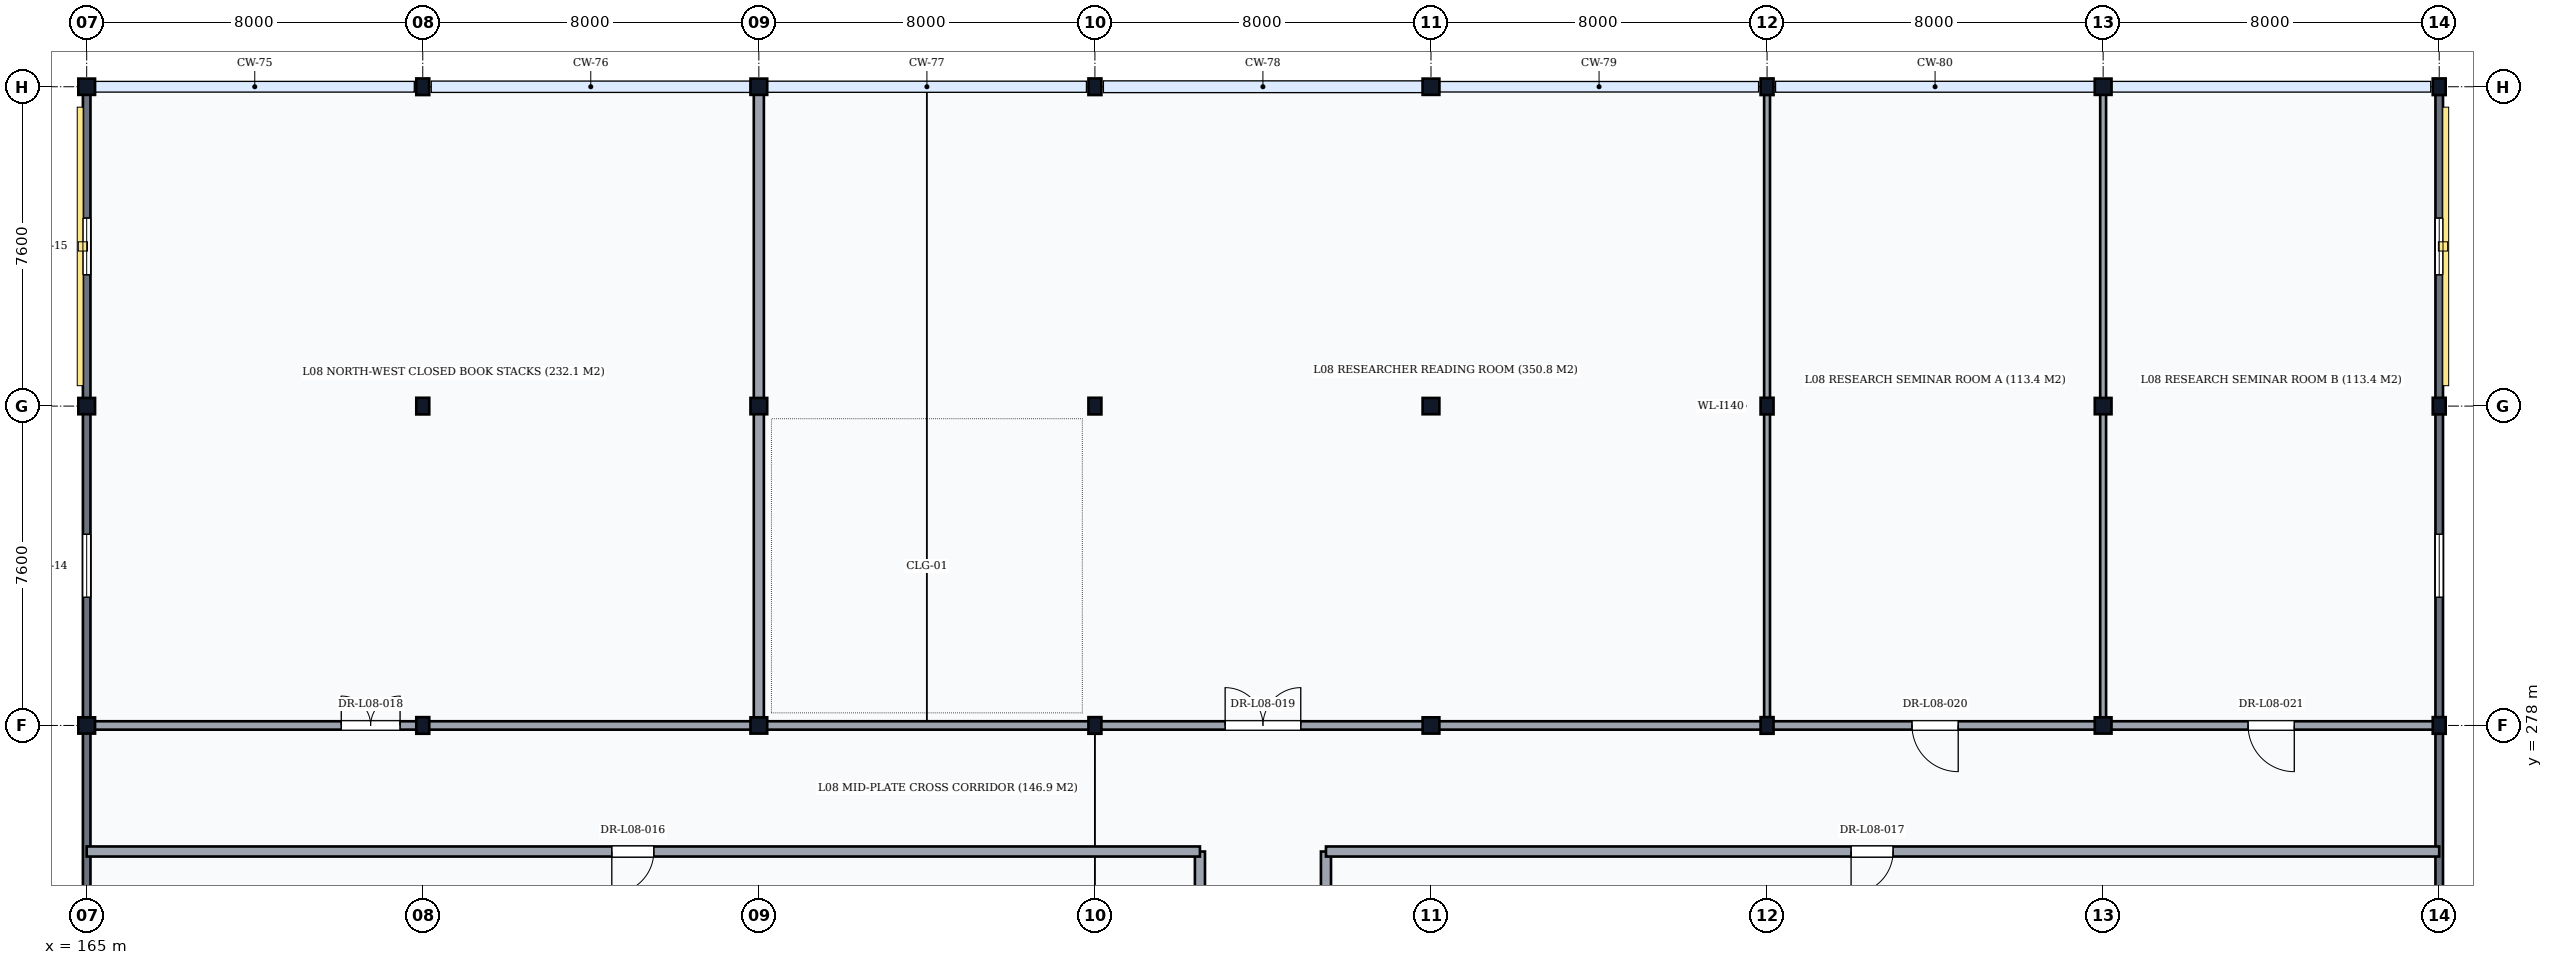
"""IFC4 building model, lengths in metres.
Left out: names, types, materials, properties, quantities, classifications, styles, units other than length and angle.
Written with IfcOpenShell. Run it as: python <this file> out.ifc"""

import sys

from ifc_helpers import new_model, si_unit, direction, frame, frame_2d, origin, origin_2d, place, context, subcontext, project, spatial, rectangle, i_section, extrude, element, fill, save


model = new_model("IFC4")
c1 = context("Model", 3, precision=1e-05, world=origin(), true_north=direction((0.0, 1.0)))
c2 = subcontext(c1, "Body", "Model", "MODEL_VIEW")
j1 = project(units=[si_unit("LENGTHUNIT", "METRE"), si_unit("PLANEANGLEUNIT", "RADIAN")], contexts=[c1])
p1 = place(None, origin())
s1 = spatial("IfcSite", under=j1, at=p1, CompositionType="ELEMENT")
p2 = place(p1, origin())
s2 = spatial("IfcBuilding", under=s1, at=p2, CompositionType="ELEMENT")
p3 = place(p2, frame((0.0, 0.0, 32.1)))
s3 = spatial("IfcBuildingStorey", under=s2, at=p3, CompositionType="ELEMENT", Elevation=32.1)
for number, where, z_axis, x_axis in (
    (1, (165.0, 278.0, 0.0), (0.0, 0.0, 1.0), (1.0, 0.0, 0.0)),
    (2, (165.0, 285.6, 0.0), (0.0, 0.0, 1.0), (1.0, 0.0, 0.0)),
    (3, (165.0, 293.2, 0.0), (0.0, 0.0, 1.0), (1.0, 0.0, 0.0)),
):
    element("IfcColumn", number, at=place(p3, frame(where, z_axis=z_axis, x_axis=x_axis)), inside=s3, PredefinedType="COLUMN", context=c2, shape_type="SweptSolid", body=[
        extrude(i_section(OverallWidth=0.398, OverallDepth=0.387, WebThickness=0.021, FlangeThickness=0.033, FilletRadius=0.015, at=origin_2d()), origin(), (0.0, 0.0, 1.0), 3.9),
    ])
for number, where, z_axis, x_axis in (
    (4, (173.0, 278.0, 0.0), (0.0, 0.0, 1.0), (1.0, 0.0, 0.0)),
    (5, (173.0, 285.6, 0.0), (0.0, 0.0, 1.0), (1.0, 0.0, 0.0)),
    (6, (173.0, 293.2, 0.0), (0.0, 0.0, 1.0), (1.0, 0.0, 0.0)),
):
    element("IfcColumn", number, at=place(p3, frame(where, z_axis=z_axis, x_axis=x_axis)), inside=s3, PredefinedType="COLUMN", context=c2, shape_type="SweptSolid", body=[
        extrude(i_section(OverallWidth=0.308, OverallDepth=0.395, WebThickness=0.021, FlangeThickness=0.04, FilletRadius=0.027, at=origin_2d()), origin(), (0.0, 0.0, 1.0), 3.9),
    ])
for number, where, z_axis, x_axis in (
    (7, (181.0, 278.0, 0.0), (0.0, 0.0, 1.0), (1.0, 0.0, 0.0)),
    (8, (181.0, 285.6, 0.0), (0.0, 0.0, 1.0), (1.0, 0.0, 0.0)),
    (9, (181.0, 293.2, 0.0), (0.0, 0.0, 1.0), (1.0, 0.0, 0.0)),
):
    element("IfcColumn", number, at=place(p3, frame(where, z_axis=z_axis, x_axis=x_axis)), inside=s3, PredefinedType="COLUMN", context=c2, shape_type="SweptSolid", body=[
        extrude(i_section(OverallWidth=0.398, OverallDepth=0.387, WebThickness=0.021, FlangeThickness=0.033, FilletRadius=0.015, at=origin_2d()), origin(), (0.0, 0.0, 1.0), 3.9),
    ])
for number, where, z_axis, x_axis in (
    (10, (189.0, 278.0, 0.0), (0.0, 0.0, 1.0), (1.0, 0.0, 0.0)),
    (11, (189.0, 285.6, 0.0), (0.0, 0.0, 1.0), (1.0, 0.0, 0.0)),
    (12, (189.0, 293.2, 0.0), (0.0, 0.0, 1.0), (1.0, 0.0, 0.0)),
):
    element("IfcColumn", number, at=place(p3, frame(where, z_axis=z_axis, x_axis=x_axis)), inside=s3, PredefinedType="COLUMN", context=c2, shape_type="SweptSolid", body=[
        extrude(i_section(OverallWidth=0.308, OverallDepth=0.395, WebThickness=0.021, FlangeThickness=0.04, FilletRadius=0.027, at=origin_2d()), origin(), (0.0, 0.0, 1.0), 3.9),
    ])
for number, where, z_axis, x_axis in (
    (13, (197.0, 278.0, 0.0), (0.0, 0.0, 1.0), (1.0, 0.0, 0.0)),
    (14, (197.0, 285.6, 0.0), (0.0, 0.0, 1.0), (1.0, 0.0, 0.0)),
    (15, (197.0, 293.2, 0.0), (0.0, 0.0, 1.0), (1.0, 0.0, 0.0)),
):
    element("IfcColumn", number, at=place(p3, frame(where, z_axis=z_axis, x_axis=x_axis)), inside=s3, PredefinedType="COLUMN", context=c2, shape_type="SweptSolid", body=[
        extrude(i_section(OverallWidth=0.398, OverallDepth=0.387, WebThickness=0.021, FlangeThickness=0.033, FilletRadius=0.015, at=origin_2d()), origin(), (0.0, 0.0, 1.0), 3.9),
    ])
for number, where, z_axis, x_axis in (
    (16, (205.0, 278.0, 0.0), (0.0, 0.0, 1.0), (1.0, 0.0, 0.0)),
    (17, (205.0, 285.6, 0.0), (0.0, 0.0, 1.0), (1.0, 0.0, 0.0)),
    (18, (205.0, 293.2, 0.0), (0.0, 0.0, 1.0), (1.0, 0.0, 0.0)),
):
    element("IfcColumn", number, at=place(p3, frame(where, z_axis=z_axis, x_axis=x_axis)), inside=s3, PredefinedType="COLUMN", context=c2, shape_type="SweptSolid", body=[
        extrude(i_section(OverallWidth=0.308, OverallDepth=0.395, WebThickness=0.021, FlangeThickness=0.04, FilletRadius=0.027, at=origin_2d()), origin(), (0.0, 0.0, 1.0), 3.9),
    ])
for number, where, z_axis, x_axis in (
    (19, (213.0, 278.0, 0.0), (0.0, 0.0, 1.0), (1.0, 0.0, 0.0)),
    (20, (213.0, 285.6, 0.0), (0.0, 0.0, 1.0), (1.0, 0.0, 0.0)),
    (21, (213.0, 293.2, 0.0), (0.0, 0.0, 1.0), (1.0, 0.0, 0.0)),
):
    element("IfcColumn", number, at=place(p3, frame(where, z_axis=z_axis, x_axis=x_axis)), inside=s3, PredefinedType="COLUMN", context=c2, shape_type="SweptSolid", body=[
        extrude(i_section(OverallWidth=0.398, OverallDepth=0.387, WebThickness=0.021, FlangeThickness=0.033, FilletRadius=0.015, at=origin_2d()), origin(), (0.0, 0.0, 1.0), 3.9),
    ])
for number, where, z_axis, x_axis in (
    (22, (221.0, 278.0, 0.0), (0.0, 0.0, 1.0), (1.0, 0.0, 0.0)),
    (23, (221.0, 285.6, 0.0), (0.0, 0.0, 1.0), (1.0, 0.0, 0.0)),
    (24, (221.0, 293.2, 0.0), (0.0, 0.0, 1.0), (1.0, 0.0, 0.0)),
):
    element("IfcColumn", number, at=place(p3, frame(where, z_axis=z_axis, x_axis=x_axis)), inside=s3, PredefinedType="COLUMN", context=c2, shape_type="SweptSolid", body=[
        extrude(i_section(OverallWidth=0.308, OverallDepth=0.395, WebThickness=0.021, FlangeThickness=0.04, FilletRadius=0.027, at=origin_2d()), origin(), (0.0, 0.0, 1.0), 3.9),
    ])
p4 = place(p3, frame((165.0, 270.406, 0.0), z_axis=(0.0, 0.0, 1.0), x_axis=(0.0, 1.0, 0.0)))
e25 = element("IfcWall", 25, at=p4, inside=s3, PredefinedType="SOLIDWALL", context=c2, shape_type="SweptSolid", body=[
    extrude(rectangle(XDim=7.588, YDim=0.18, at=frame_2d((3.794, 0.0))), origin(), (0.0, 0.0, 1.0), 3.408),
])
p5 = place(p4, frame((1.722, 0.0, 0.95)))
e26 = element("IfcOpeningElement", 26, at=p5, cuts=e25, PredefinedType="OPENING", context=c2, shape_type="SweptSolid", body=[
    extrude(rectangle(XDim=1.6, YDim=2.0, at=frame_2d((0.8, 1.0))), frame((0.0, 0.105, 0.0), z_axis=(0.0, -1.0, 0.0), x_axis=(1.0, 0.0, 0.0)), (0.0, 0.0, 1.0), 0.21),
])
p6 = place(p3, frame((165.0, 278.006, 0.0), z_axis=(0.0, 0.0, 1.0), x_axis=(0.0, 1.0, 0.0)))
e27 = element("IfcWall", 27, at=p6, inside=s3, PredefinedType="SOLIDWALL", context=c2, shape_type="SweptSolid", body=[
    extrude(rectangle(XDim=7.588, YDim=0.18, at=frame_2d((3.794, 0.0))), origin(), (0.0, 0.0, 1.0), 3.408),
])
p7 = place(p6, frame((3.044, 0.0, 0.95)))
e28 = element("IfcOpeningElement", 28, at=p7, cuts=e27, PredefinedType="OPENING", context=c2, shape_type="SweptSolid", body=[
    extrude(rectangle(XDim=1.5, YDim=1.9, at=frame_2d((0.75, 0.95))), frame((0.0, 0.105, 0.0), z_axis=(0.0, -1.0, 0.0), x_axis=(1.0, 0.0, 0.0)), (0.0, 0.0, 1.0), 0.21),
])
p8 = place(p3, frame((165.0, 285.606, 0.0), z_axis=(0.0, 0.0, 1.0), x_axis=(0.0, 1.0, 0.0)))
e29 = element("IfcWall", 29, at=p8, inside=s3, PredefinedType="SOLIDWALL", context=c2, shape_type="SweptSolid", body=[
    extrude(rectangle(XDim=7.588, YDim=0.18, at=frame_2d((3.794, 0.0))), origin(), (0.0, 0.0, 1.0), 3.408),
])
p9 = place(p8, frame((3.119, 0.0, 0.95)))
e30 = element("IfcOpeningElement", 30, at=p9, cuts=e29, PredefinedType="OPENING", context=c2, shape_type="SweptSolid", body=[
    extrude(rectangle(XDim=1.35, YDim=1.8, at=frame_2d((0.675, 0.9))), frame((0.0, 0.105, 0.0), z_axis=(0.0, -1.0, 0.0), x_axis=(1.0, 0.0, 0.0)), (0.0, 0.0, 1.0), 0.21),
])
p10 = place(p3, frame((221.0, 270.406, 0.0), z_axis=(0.0, 0.0, 1.0), x_axis=(0.0, 1.0, 0.0)))
e31 = element("IfcWall", 31, at=p10, inside=s3, PredefinedType="SOLIDWALL", context=c2, shape_type="SweptSolid", body=[
    extrude(rectangle(XDim=7.588, YDim=0.18, at=frame_2d((3.794, 0.0))), origin(), (0.0, 0.0, 1.0), 3.408),
])
p11 = place(p10, frame((1.722, 0.0, 0.95)))
e32 = element("IfcOpeningElement", 32, at=p11, cuts=e31, PredefinedType="OPENING", context=c2, shape_type="SweptSolid", body=[
    extrude(rectangle(XDim=1.6, YDim=2.0, at=frame_2d((0.8, 1.0))), frame((0.0, 0.105, 0.0), z_axis=(0.0, -1.0, 0.0), x_axis=(1.0, 0.0, 0.0)), (0.0, 0.0, 1.0), 0.21),
])
p12 = place(p3, frame((221.0, 278.006, 0.0), z_axis=(0.0, 0.0, 1.0), x_axis=(0.0, 1.0, 0.0)))
e33 = element("IfcWall", 33, at=p12, inside=s3, PredefinedType="SOLIDWALL", context=c2, shape_type="SweptSolid", body=[
    extrude(rectangle(XDim=7.588, YDim=0.18, at=frame_2d((3.794, 0.0))), origin(), (0.0, 0.0, 1.0), 3.408),
])
p13 = place(p12, frame((3.044, 0.0, 0.95)))
e34 = element("IfcOpeningElement", 34, at=p13, cuts=e33, PredefinedType="OPENING", context=c2, shape_type="SweptSolid", body=[
    extrude(rectangle(XDim=1.5, YDim=1.9, at=frame_2d((0.75, 0.95))), frame((0.0, 0.105, 0.0), z_axis=(0.0, -1.0, 0.0), x_axis=(1.0, 0.0, 0.0)), (0.0, 0.0, 1.0), 0.21),
])
p14 = place(p3, frame((221.0, 285.606, 0.0), z_axis=(0.0, 0.0, 1.0), x_axis=(0.0, 1.0, 0.0)))
e35 = element("IfcWall", 35, at=p14, inside=s3, PredefinedType="SOLIDWALL", context=c2, shape_type="SweptSolid", body=[
    extrude(rectangle(XDim=7.588, YDim=0.18, at=frame_2d((3.794, 0.0))), origin(), (0.0, 0.0, 1.0), 3.408),
])
p15 = place(p14, frame((3.119, 0.0, 0.95)))
e36 = element("IfcOpeningElement", 36, at=p15, cuts=e35, PredefinedType="OPENING", context=c2, shape_type="SweptSolid", body=[
    extrude(rectangle(XDim=1.35, YDim=1.8, at=frame_2d((0.675, 0.9))), frame((0.0, 0.105, 0.0), z_axis=(0.0, -1.0, 0.0), x_axis=(1.0, 0.0, 0.0)), (0.0, 0.0, 1.0), 0.21),
])
for number, where, z_axis, x_axis in (
    (37, (191.5, 258.2, 0.0), (0.0, 0.0, 1.0), (0.0, 1.0, 0.0)),
    (38, (194.5, 258.2, 0.0), (0.0, 0.0, 1.0), (0.0, 1.0, 0.0)),
):
    element("IfcWall", number, at=place(p3, frame(where, z_axis=z_axis, x_axis=x_axis)), inside=s3, PredefinedType="PARTITIONING", context=c2, shape_type="SweptSolid", body=[
        extrude(rectangle(XDim=16.8, YDim=0.24, at=frame_2d((8.4, 0.0))), origin(), (0.0, 0.0, 1.0), 3.68),
    ])
p16 = place(p3, frame((165.0, 275.0, 0.0), z_axis=(0.0, 0.0, 1.0), x_axis=(1.0, 0.0, 0.0)))
e39 = element("IfcWall", 39, at=p16, inside=s3, PredefinedType="PARTITIONING", context=c2, shape_type="SweptSolid", body=[
    extrude(rectangle(XDim=26.5, YDim=0.24, at=frame_2d((13.25, 0.0))), origin(), (0.0, 0.0, 1.0), 3.68),
])
p17 = place(p16, frame((12.5, 0.0, 0.0)))
e40 = element("IfcOpeningElement", 40, at=p17, cuts=e39, PredefinedType="OPENING", context=c2, shape_type="SweptSolid", body=[
    extrude(rectangle(XDim=1.0, YDim=2.1, at=frame_2d((0.5, 1.05))), frame((0.0, 0.135, 0.0), z_axis=(0.0, -1.0, 0.0), x_axis=(1.0, 0.0, 0.0)), (0.0, 0.0, 1.0), 0.27),
])
p18 = place(p3, frame((194.5, 275.0, 0.0), z_axis=(0.0, 0.0, 1.0), x_axis=(1.0, 0.0, 0.0)))
e41 = element("IfcWall", 41, at=p18, inside=s3, PredefinedType="PARTITIONING", context=c2, shape_type="SweptSolid", body=[
    extrude(rectangle(XDim=26.5, YDim=0.24, at=frame_2d((13.25, 0.0))), origin(), (0.0, 0.0, 1.0), 3.68),
])
p19 = place(p18, frame((12.5, 0.0, 0.0)))
e42 = element("IfcOpeningElement", 42, at=p19, cuts=e41, PredefinedType="OPENING", context=c2, shape_type="SweptSolid", body=[
    extrude(rectangle(XDim=1.0, YDim=2.1, at=frame_2d((0.5, 1.05))), frame((0.0, 0.135, 0.0), z_axis=(0.0, -1.0, 0.0), x_axis=(1.0, 0.0, 0.0)), (0.0, 0.0, 1.0), 0.27),
])
p20 = place(p3, frame((165.0, 278.0, 0.0), z_axis=(0.0, 0.0, 1.0), x_axis=(1.0, 0.0, 0.0)))
e43 = element("IfcWall", 43, at=p20, inside=s3, PredefinedType="PARTITIONING", context=c2, shape_type="SweptSolid", body=[
    extrude(rectangle(XDim=56.0, YDim=0.2, at=frame_2d((28.0, 0.0))), origin(), (0.0, 0.0, 1.0), 3.078),
])
p21 = place(p20, frame((6.06, 0.0, 0.0)))
e44 = element("IfcOpeningElement", 44, at=p21, cuts=e43, PredefinedType="OPENING", context=c2, shape_type="SweptSolid", body=[
    extrude(rectangle(XDim=1.4, YDim=2.1, at=frame_2d((0.7, 1.05))), frame((0.0, 0.115, 0.0), z_axis=(0.0, -1.0, 0.0), x_axis=(1.0, 0.0, 0.0)), (0.0, 0.0, 1.0), 0.23),
])
p22 = place(p20, frame((27.1, 0.0, 0.0)))
e45 = element("IfcOpeningElement", 45, at=p22, cuts=e43, PredefinedType="OPENING", context=c2, shape_type="SweptSolid", body=[
    extrude(rectangle(XDim=1.8, YDim=2.4, at=frame_2d((0.9, 1.2))), frame((0.0, 0.115, 0.0), z_axis=(0.0, -1.0, 0.0), x_axis=(1.0, 0.0, 0.0)), (0.0, 0.0, 1.0), 0.23),
])
p23 = place(p20, frame((43.45, 0.0, 0.0)))
e46 = element("IfcOpeningElement", 46, at=p23, cuts=e43, PredefinedType="OPENING", context=c2, shape_type="SweptSolid", body=[
    extrude(rectangle(XDim=1.1, YDim=2.1, at=frame_2d((0.55, 1.05))), frame((0.0, 0.115, 0.0), z_axis=(0.0, -1.0, 0.0), x_axis=(1.0, 0.0, 0.0)), (0.0, 0.0, 1.0), 0.23),
])
p24 = place(p20, frame((51.45, 0.0, 0.0)))
e47 = element("IfcOpeningElement", 47, at=p24, cuts=e43, PredefinedType="OPENING", context=c2, shape_type="SweptSolid", body=[
    extrude(rectangle(XDim=1.1, YDim=2.1, at=frame_2d((0.55, 1.05))), frame((0.0, 0.115, 0.0), z_axis=(0.0, -1.0, 0.0), x_axis=(1.0, 0.0, 0.0)), (0.0, 0.0, 1.0), 0.23),
])
p25 = place(p3, frame((181.0, 278.0, 0.0), z_axis=(0.0, 0.0, 1.0), x_axis=(0.0, 1.0, 0.0)))
e48 = element("IfcWall", 48, at=p25, inside=s3, PredefinedType="PARTITIONING", context=c2, shape_type="SweptSolid", body=[
    extrude(rectangle(XDim=15.2, YDim=0.24, at=frame_2d((7.6, 0.0))), origin(), (0.0, 0.0, 1.0), 3.228),
])
for number, where, z_axis, x_axis in (
    (49, (205.0, 278.0, 0.0), (0.0, 0.0, 1.0), (0.0, 1.0, 0.0)),
    (50, (213.0, 278.0, 0.0), (0.0, 0.0, 1.0), (0.0, 1.0, 0.0)),
):
    element("IfcWall", number, at=place(p3, frame(where, z_axis=z_axis, x_axis=x_axis)), inside=s3, PredefinedType="PARTITIONING", context=c2, shape_type="SweptSolid", body=[
        extrude(rectangle(XDim=15.2, YDim=0.14, at=frame_2d((7.6, 0.0))), origin(), (0.0, 0.0, 1.0), 3.228),
    ])
p26 = place(p7, origin())
e51 = element("IfcWindow", 51, at=p26, inside=s3, PartitioningType="SINGLE_PANEL", PredefinedType="WINDOW", context=c2, shape_type="SweptSolid", body=[
    extrude(rectangle(XDim=1.5, YDim=1.9, at=frame_2d((0.75, 0.95))), frame((0.0, 0.03, 0.0), z_axis=(0.0, -1.0, 0.0), x_axis=(1.0, 0.0, 0.0)), (0.0, 0.0, 1.0), 0.06),
])
fill(e28, e51)
p27 = place(p9, origin())
e52 = element("IfcWindow", 52, at=p27, inside=s3, PartitioningType="SINGLE_PANEL", PredefinedType="WINDOW", context=c2, shape_type="SweptSolid", body=[
    extrude(rectangle(XDim=1.35, YDim=1.8, at=frame_2d((0.675, 0.9))), frame((0.0, 0.03, 0.0), z_axis=(0.0, -1.0, 0.0), x_axis=(1.0, 0.0, 0.0)), (0.0, 0.0, 1.0), 0.06),
])
fill(e30, e52)
p28 = place(p13, origin())
e53 = element("IfcWindow", 53, at=p28, inside=s3, PartitioningType="SINGLE_PANEL", PredefinedType="WINDOW", context=c2, shape_type="SweptSolid", body=[
    extrude(rectangle(XDim=1.5, YDim=1.9, at=frame_2d((0.75, 0.95))), frame((0.0, 0.03, 0.0), z_axis=(0.0, -1.0, 0.0), x_axis=(1.0, 0.0, 0.0)), (0.0, 0.0, 1.0), 0.06),
])
fill(e34, e53)
p29 = place(p15, origin())
e54 = element("IfcWindow", 54, at=p29, inside=s3, PartitioningType="SINGLE_PANEL", PredefinedType="WINDOW", context=c2, shape_type="SweptSolid", body=[
    extrude(rectangle(XDim=1.35, YDim=1.8, at=frame_2d((0.675, 0.9))), frame((0.0, 0.03, 0.0), z_axis=(0.0, -1.0, 0.0), x_axis=(1.0, 0.0, 0.0)), (0.0, 0.0, 1.0), 0.06),
])
fill(e36, e54)
p30 = place(p17, frame((1.0, 0.0, 0.0), z_axis=(0.0, 0.0, 1.0), x_axis=(-1.0, 0.0, 0.0)))
e55 = element("IfcDoor", 55, at=p30, inside=s3, OperationType="SINGLE_SWING_RIGHT", PredefinedType="DOOR", context=c2, shape_type="SweptSolid", body=[
    extrude(rectangle(XDim=1.0, YDim=2.1, at=frame_2d((0.5, 1.05))), frame((0.0, 0.025, 0.0), z_axis=(0.0, -1.0, 0.0), x_axis=(1.0, 0.0, 0.0)), (0.0, 0.0, 1.0), 0.05),
])
fill(e40, e55)
p31 = place(p19, frame((1.0, 0.0, 0.0), z_axis=(0.0, 0.0, 1.0), x_axis=(-1.0, 0.0, 0.0)))
e56 = element("IfcDoor", 56, at=p31, inside=s3, OperationType="SINGLE_SWING_RIGHT", PredefinedType="DOOR", context=c2, shape_type="SweptSolid", body=[
    extrude(rectangle(XDim=1.0, YDim=2.1, at=frame_2d((0.5, 1.05))), frame((0.0, 0.025, 0.0), z_axis=(0.0, -1.0, 0.0), x_axis=(1.0, 0.0, 0.0)), (0.0, 0.0, 1.0), 0.05),
])
fill(e42, e56)
p32 = place(p21, origin())
e57 = element("IfcDoor", 57, at=p32, inside=s3, OperationType="DOUBLE_DOOR_SINGLE_SWING", PredefinedType="DOOR", context=c2, shape_type="SweptSolid", body=[
    extrude(rectangle(XDim=1.4, YDim=2.1, at=frame_2d((0.7, 1.05))), frame((0.0, 0.025, 0.0), z_axis=(0.0, -1.0, 0.0), x_axis=(1.0, 0.0, 0.0)), (0.0, 0.0, 1.0), 0.05),
])
fill(e44, e57)
p33 = place(p22, origin())
e58 = element("IfcDoor", 58, at=p33, inside=s3, OperationType="DOUBLE_DOOR_SINGLE_SWING", PredefinedType="DOOR", context=c2, shape_type="SweptSolid", body=[
    extrude(rectangle(XDim=1.8, YDim=2.4, at=frame_2d((0.9, 1.2))), frame((0.0, 0.025, 0.0), z_axis=(0.0, -1.0, 0.0), x_axis=(1.0, 0.0, 0.0)), (0.0, 0.0, 1.0), 0.05),
])
fill(e45, e58)
p34 = place(p23, origin())
e59 = element("IfcDoor", 59, at=p34, inside=s3, OperationType="SINGLE_SWING_RIGHT", PredefinedType="DOOR", context=c2, shape_type="SweptSolid", body=[
    extrude(rectangle(XDim=1.1, YDim=2.1, at=frame_2d((0.55, 1.05))), frame((0.0, 0.025, 0.0), z_axis=(0.0, -1.0, 0.0), x_axis=(1.0, 0.0, 0.0)), (0.0, 0.0, 1.0), 0.05),
])
fill(e46, e59)
p35 = place(p24, origin())
e60 = element("IfcDoor", 60, at=p35, inside=s3, OperationType="SINGLE_SWING_RIGHT", PredefinedType="DOOR", context=c2, shape_type="SweptSolid", body=[
    extrude(rectangle(XDim=1.1, YDim=2.1, at=frame_2d((0.55, 1.05))), frame((0.0, 0.025, 0.0), z_axis=(0.0, -1.0, 0.0), x_axis=(1.0, 0.0, 0.0)), (0.0, 0.0, 1.0), 0.05),
])
fill(e47, e60)
save(model, sys.argv[1])
